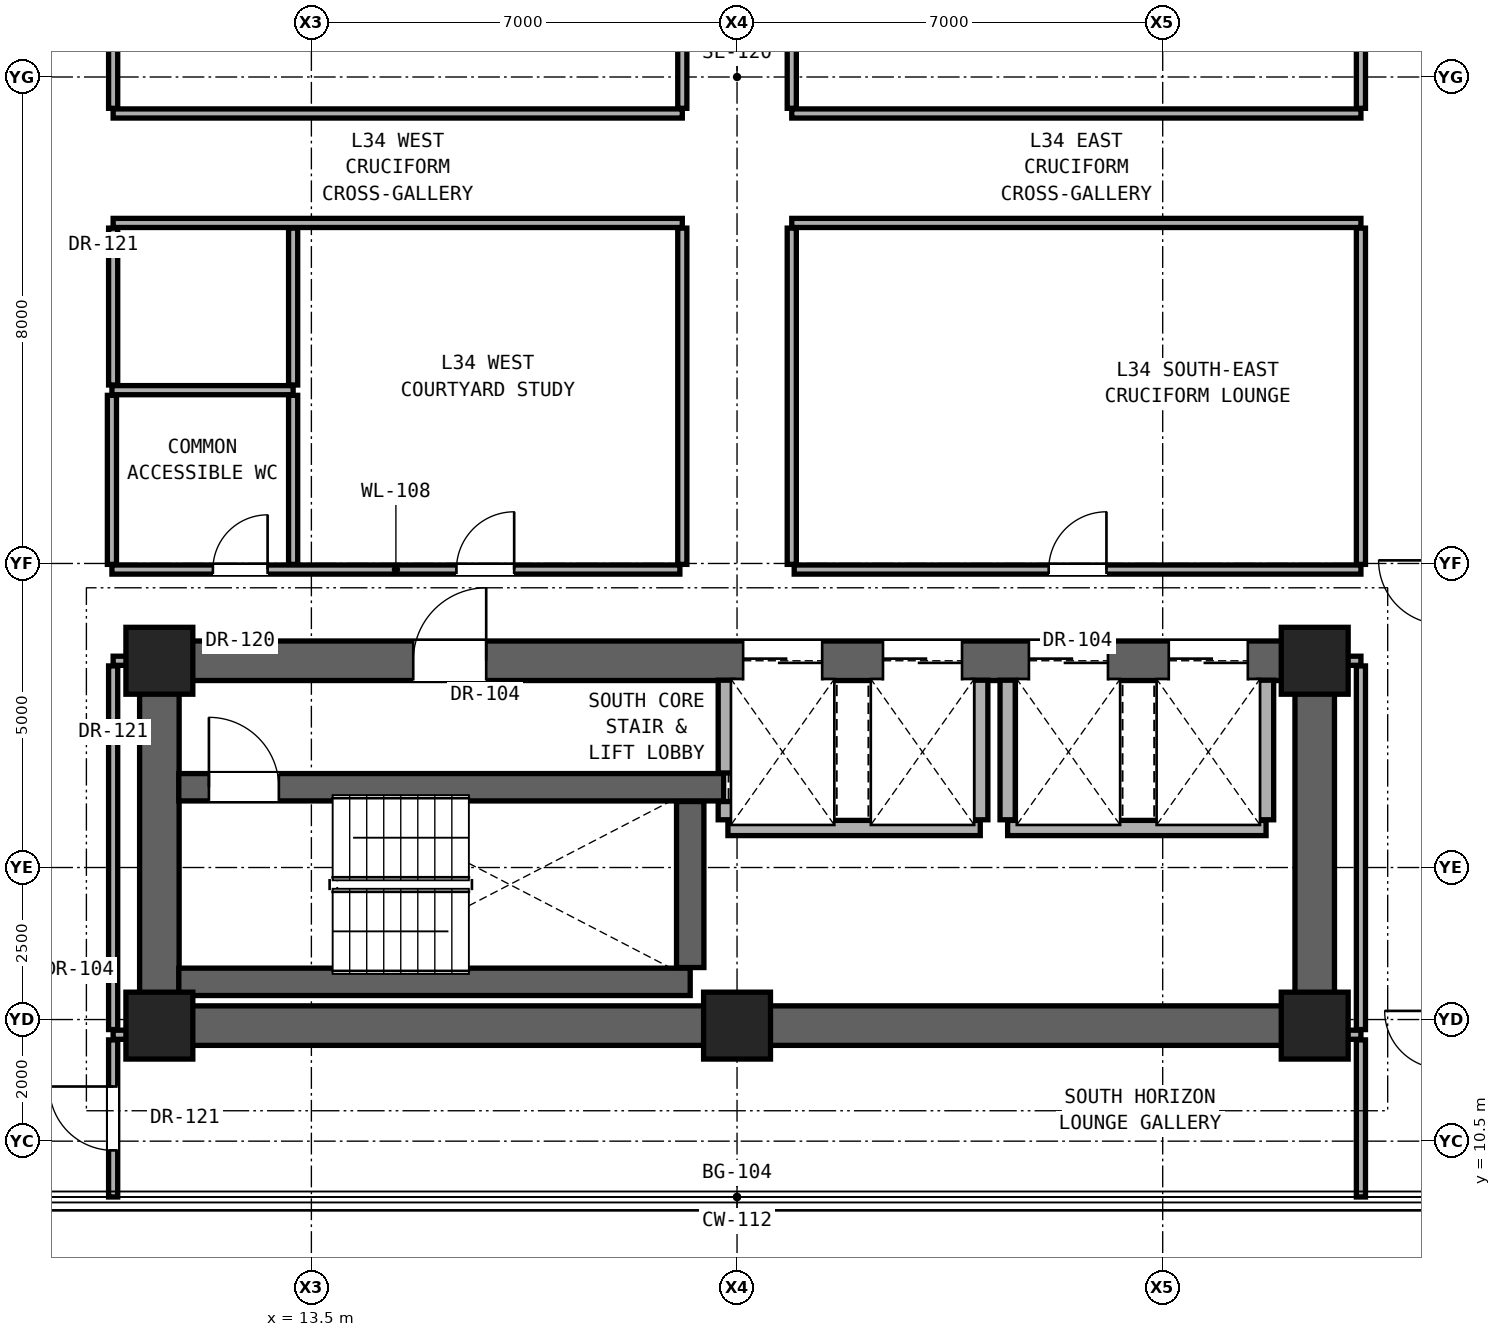
"""IFC4 building model, lengths in metres.
Left out: names, types, materials, properties, quantities, classifications, styles, units other than length and angle.
Written with IfcOpenShell. Run it as: python <this file> out.ifc"""

import sys

from ifc_helpers import new_model, si_unit, direction, frame, frame_2d, origin, origin_2d, place, context, subcontext, project, spatial, rectangle, extrude, element, fill, save


model = new_model("IFC4")
c1 = context("Model", 3, precision=1e-05, world=origin(), true_north=direction((0.0, 1.0)))
c2 = subcontext(c1, "Body", "Model", "MODEL_VIEW")
j1 = project(units=[si_unit("LENGTHUNIT", "METRE"), si_unit("PLANEANGLEUNIT", "RADIAN")], contexts=[c1])
p1 = place(None, origin())
s1 = spatial("IfcSite", under=j1, at=p1, CompositionType="ELEMENT")
p2 = place(p1, origin())
s2 = spatial("IfcBuilding", under=s1, at=p2, CompositionType="ELEMENT")
p3 = place(p2, frame((0.0, 0.0, 121.4)))
s3 = spatial("IfcBuildingStorey", under=s2, at=p3, CompositionType="ELEMENT", Elevation=121.4)
for number, where, z_axis, x_axis in (
    (1, (11.0, 12.4, 0.0), (0.0, 0.0, 1.0), (1.0, 0.0, 0.0)),
    (2, (20.5, 12.4, 0.0), (0.0, 0.0, 1.0), (1.0, 0.0, 0.0)),
    (3, (30.0, 12.4, 0.0), (0.0, 0.0, 1.0), (1.0, 0.0, 0.0)),
    (4, (11.0, 18.4, 0.0), (0.0, 0.0, 1.0), (1.0, 0.0, 0.0)),
    (5, (30.0, 18.4, 0.0), (0.0, 0.0, 1.0), (1.0, 0.0, 0.0)),
):
    element("IfcColumn", number, at=place(p3, frame(where, z_axis=z_axis, x_axis=x_axis)), inside=s3, PredefinedType="COLUMN", context=c2, shape_type="SweptSolid", body=[
        extrude(rectangle(XDim=1.1, YDim=1.1, at=origin_2d()), origin(), (0.0, 0.0, 1.0), 3.3),
    ])
p4 = place(p3, frame((11.0, 12.4, 0.0), z_axis=(0.0, 0.0, 1.0), x_axis=(1.0, 0.0, 0.0)))
e6 = element("IfcWall", 6, at=p4, inside=s3, PredefinedType="SHEAR", context=c2, shape_type="SweptSolid", body=[
    extrude(rectangle(XDim=19.0, YDim=0.65, at=frame_2d((9.5, 0.0))), origin(), (0.0, 0.0, 1.0), 3.08),
])
for number, where, z_axis, x_axis in (
    (7, (11.0, 12.4, 0.0), (0.0, 0.0, 1.0), (0.0, 1.0, 0.0)),
    (8, (30.0, 12.4, 0.0), (0.0, 0.0, 1.0), (0.0, 1.0, 0.0)),
):
    element("IfcWall", number, at=place(p3, frame(where, z_axis=z_axis, x_axis=x_axis)), inside=s3, PredefinedType="SHEAR", context=c2, shape_type="SweptSolid", body=[
        extrude(rectangle(XDim=6.0, YDim=0.65, at=frame_2d((3.0, 0.0))), origin(), (0.0, 0.0, 1.0), 3.08),
    ])
p5 = place(p3, frame((11.0, 18.4, 0.0), z_axis=(0.0, 0.0, 1.0), x_axis=(1.0, 0.0, 0.0)))
e9 = element("IfcWall", 9, at=p5, inside=s3, PredefinedType="SHEAR", context=c2, shape_type="SweptSolid", body=[
    extrude(rectangle(XDim=19.0, YDim=0.65, at=frame_2d((9.5, 0.0))), origin(), (0.0, 0.0, 1.0), 3.08),
])
p6 = place(p5, frame((4.175, 0.0, 0.0)))
e10 = element("IfcOpeningElement", 10, at=p6, cuts=e9, PredefinedType="OPENING", context=c2, shape_type="SweptSolid", body=[
    extrude(rectangle(XDim=1.2, YDim=2.25, at=frame_2d((0.6, 1.125))), frame((0.0, 0.335, 0.0), z_axis=(0.0, -1.0, 0.0), x_axis=(1.0, 0.0, 0.0)), (0.0, 0.0, 1.0), 0.67),
])
p7 = place(p5, frame((9.6, 0.0, 0.0)))
e11 = element("IfcOpeningElement", 11, at=p7, cuts=e9, PredefinedType="OPENING", context=c2, shape_type="SweptSolid", body=[
    extrude(rectangle(XDim=1.3, YDim=2.3, at=frame_2d((0.65, 1.15))), frame((0.0, 0.335, 0.0), z_axis=(0.0, -1.0, 0.0), x_axis=(1.0, 0.0, 0.0)), (0.0, 0.0, 1.0), 0.67),
])
p8 = place(p5, frame((11.9, 0.0, 0.0)))
e12 = element("IfcOpeningElement", 12, at=p8, cuts=e9, PredefinedType="OPENING", context=c2, shape_type="SweptSolid", body=[
    extrude(rectangle(XDim=1.3, YDim=2.3, at=frame_2d((0.65, 1.15))), frame((0.0, 0.335, 0.0), z_axis=(0.0, -1.0, 0.0), x_axis=(1.0, 0.0, 0.0)), (0.0, 0.0, 1.0), 0.67),
])
p9 = place(p5, frame((14.3, 0.0, 0.0)))
e13 = element("IfcOpeningElement", 13, at=p9, cuts=e9, PredefinedType="OPENING", context=c2, shape_type="SweptSolid", body=[
    extrude(rectangle(XDim=1.3, YDim=2.3, at=frame_2d((0.65, 1.15))), frame((0.0, 0.335, 0.0), z_axis=(0.0, -1.0, 0.0), x_axis=(1.0, 0.0, 0.0)), (0.0, 0.0, 1.0), 0.67),
])
p10 = place(p5, frame((16.6, 0.0, 0.0)))
e14 = element("IfcOpeningElement", 14, at=p10, cuts=e9, PredefinedType="OPENING", context=c2, shape_type="SweptSolid", body=[
    extrude(rectangle(XDim=1.3, YDim=2.3, at=frame_2d((0.65, 1.15))), frame((0.0, 0.335, 0.0), z_axis=(0.0, -1.0, 0.0), x_axis=(1.0, 0.0, 0.0)), (0.0, 0.0, 1.0), 0.67),
])
for number, where, z_axis, x_axis in (
    (15, (10.24, 12.25, 0.0), (0.0, 0.0, 1.0), (1.0, 0.0, 0.0)),
    (16, (30.32, 12.25, 0.0), (0.0, 0.0, 1.0), (1.0, 0.0, 0.0)),
):
    element("IfcWall", number, at=place(p3, frame(where, z_axis=z_axis, x_axis=x_axis)), inside=s3, PredefinedType="PARTITIONING", context=c2, shape_type="SweptSolid", body=[
        extrude(rectangle(XDim=0.44, YDim=0.15, at=frame_2d((0.22, 0.0))), origin(), (0.0, 0.0, 1.0), 3.08),
    ])
p11 = place(p3, frame((11.32, 13.12, 0.0), z_axis=(0.0, 0.0, 1.0), x_axis=(1.0, 0.0, 0.0)))
e17 = element("IfcWall", 17, at=p11, inside=s3, PredefinedType="SHEAR", context=c2, shape_type="SweptSolid", body=[
    extrude(rectangle(XDim=8.41, YDim=0.45, at=frame_2d((4.205, 0.0))), origin(), (0.0, 0.0, 1.0), 3.08),
])
p12 = place(p3, frame((20.35, 15.65, 0.0), z_axis=(0.0, 0.0, 1.0), x_axis=(1.0, 0.0, 0.0)))
e18 = element("IfcWall", 18, at=p12, inside=s3, PredefinedType="SOLIDWALL", context=c2, shape_type="SweptSolid", body=[
    extrude(rectangle(XDim=4.15, YDim=0.25, at=frame_2d((2.075, 0.0))), origin(), (0.0, 0.0, 1.0), 3.08),
])
p13 = place(p3, frame((24.95, 15.65, 0.0), z_axis=(0.0, 0.0, 1.0), x_axis=(1.0, 0.0, 0.0)))
e19 = element("IfcWall", 19, at=p13, inside=s3, PredefinedType="SOLIDWALL", context=c2, shape_type="SweptSolid", body=[
    extrude(rectangle(XDim=4.25, YDim=0.25, at=frame_2d((2.125, 0.0))), origin(), (0.0, 0.0, 1.0), 3.08),
])
p14 = place(p3, frame((11.32, 16.32, 0.0), z_axis=(0.0, 0.0, 1.0), x_axis=(1.0, 0.0, 0.0)))
e20 = element("IfcWall", 20, at=p14, inside=s3, PredefinedType="SHEAR", context=c2, shape_type="SweptSolid", body=[
    extrude(rectangle(XDim=8.96, YDim=0.45, at=frame_2d((4.48, 0.0))), origin(), (0.0, 0.0, 1.0), 3.08),
])
p15 = place(p14, frame((0.495, 0.0, 0.0)))
e21 = element("IfcOpeningElement", 21, at=p15, cuts=e20, PredefinedType="OPENING", context=c2, shape_type="SweptSolid", body=[
    extrude(rectangle(XDim=1.15, YDim=2.2, at=frame_2d((0.575, 1.1))), frame((0.0, 0.235, 0.0), z_axis=(0.0, -1.0, 0.0), x_axis=(1.0, 0.0, 0.0)), (0.0, 0.0, 1.0), 0.47),
])
for number, where, z_axis, x_axis in (
    (22, (10.24, 18.4, 0.0), (0.0, 0.0, 1.0), (1.0, 0.0, 0.0)),
    (23, (30.32, 18.4, 0.0), (0.0, 0.0, 1.0), (1.0, 0.0, 0.0)),
):
    element("IfcWall", number, at=place(p3, frame(where, z_axis=z_axis, x_axis=x_axis)), inside=s3, PredefinedType="PARTITIONING", context=c2, shape_type="SweptSolid", body=[
        extrude(rectangle(XDim=0.44, YDim=0.15, at=frame_2d((0.22, 0.0))), origin(), (0.0, 0.0, 1.0), 2.456),
    ])
p16 = place(p3, frame((10.22, 19.9, 0.0), z_axis=(0.0, 0.0, 1.0), x_axis=(1.0, 0.0, 0.0)))
e24 = element("IfcWall", 24, at=p16, inside=s3, PredefinedType="PARTITIONING", context=c2, shape_type="SweptSolid", body=[
    extrude(rectangle(XDim=9.34, YDim=0.15, at=frame_2d((4.67, 0.0))), origin(), (0.0, 0.0, 1.0), 2.216),
])
p17 = place(p16, frame((1.66, 0.0, 0.0)))
e25 = element("IfcOpeningElement", 25, at=p17, cuts=e24, PredefinedType="OPENING", context=c2, shape_type="SweptSolid", body=[
    extrude(rectangle(XDim=0.9, YDim=2.1, at=frame_2d((0.45, 1.05))), frame((0.0, 0.085, 0.0), z_axis=(0.0, -1.0, 0.0), x_axis=(1.0, 0.0, 0.0)), (0.0, 0.0, 1.0), 0.17),
])
p18 = place(p16, frame((5.665, 0.0, 0.0)))
e26 = element("IfcOpeningElement", 26, at=p18, cuts=e24, PredefinedType="OPENING", context=c2, shape_type="SweptSolid", body=[
    extrude(rectangle(XDim=0.95, YDim=2.15, at=frame_2d((0.475, 1.075))), frame((0.0, 0.085, 0.0), z_axis=(0.0, -1.0, 0.0), x_axis=(1.0, 0.0, 0.0)), (0.0, 0.0, 1.0), 0.17),
])
p19 = place(p3, frame((21.44, 19.9, 0.0), z_axis=(0.0, 0.0, 1.0), x_axis=(1.0, 0.0, 0.0)))
e27 = element("IfcWall", 27, at=p19, inside=s3, PredefinedType="PARTITIONING", context=c2, shape_type="SweptSolid", body=[
    extrude(rectangle(XDim=9.32, YDim=0.15, at=frame_2d((4.66, 0.0))), origin(), (0.0, 0.0, 1.0), 2.216),
])
p20 = place(p19, frame((4.185, 0.0, 0.0)))
e28 = element("IfcOpeningElement", 28, at=p20, cuts=e27, PredefinedType="OPENING", context=c2, shape_type="SweptSolid", body=[
    extrude(rectangle(XDim=0.95, YDim=2.15, at=frame_2d((0.475, 1.075))), frame((0.0, 0.085, 0.0), z_axis=(0.0, -1.0, 0.0), x_axis=(1.0, 0.0, 0.0)), (0.0, 0.0, 1.0), 0.17),
])
p21 = place(p3, frame((10.22, 22.85, 0.0), z_axis=(0.0, 0.0, 1.0), x_axis=(1.0, 0.0, 0.0)))
e29 = element("IfcWall", 29, at=p21, inside=s3, PredefinedType="PARTITIONING", context=c2, shape_type="SweptSolid", body=[
    extrude(rectangle(XDim=2.98, YDim=0.15, at=frame_2d((1.49, 0.0))), origin(), (0.0, 0.0, 1.0), 2.216),
])
for number, where, z_axis, x_axis in (
    (30, (10.24, 25.6, 0.0), (0.0, 0.0, 1.0), (1.0, 0.0, 0.0)),
    (31, (21.4, 25.6, 0.0), (0.0, 0.0, 1.0), (1.0, 0.0, 0.0)),
    (32, (10.24, 27.4, 0.0), (0.0, 0.0, 1.0), (1.0, 0.0, 0.0)),
    (33, (21.4, 27.4, 0.0), (0.0, 0.0, 1.0), (1.0, 0.0, 0.0)),
):
    element("IfcWall", number, at=place(p3, frame(where, z_axis=z_axis, x_axis=x_axis)), inside=s3, PredefinedType="PARTITIONING", context=c2, shape_type="SweptSolid", body=[
        extrude(rectangle(XDim=9.36, YDim=0.15, at=frame_2d((4.68, 0.0))), origin(), (0.0, 0.0, 1.0), 2.216),
    ])
p22 = place(p3, frame((10.22, 19.985, 0.0), z_axis=(0.0, 0.0, 1.0), x_axis=(0.0, 1.0, 0.0)))
e34 = element("IfcWall", 34, at=p22, inside=s3, PredefinedType="PARTITIONING", context=c2, shape_type="SweptSolid", body=[
    extrude(rectangle(XDim=2.78, YDim=0.15, at=frame_2d((1.39, 0.0))), origin(), (0.0, 0.0, 1.0), 3.08),
])
p23 = place(p3, frame((10.24, 9.582, 0.0), z_axis=(0.0, 0.0, 1.0), x_axis=(0.0, 1.0, 0.0)))
e35 = element("IfcWall", 35, at=p23, inside=s3, PredefinedType="PARTITIONING", context=c2, shape_type="SweptSolid", body=[
    extrude(rectangle(XDim=2.583, YDim=0.15, at=frame_2d((1.292, 0.0))), origin(), (0.0, 0.0, 1.0), 3.08),
])
p24 = place(p23, frame((0.767, 0.0, 0.0)))
e36 = element("IfcOpeningElement", 36, at=p24, cuts=e35, PredefinedType="OPENING", context=c2, shape_type="SweptSolid", body=[
    extrude(rectangle(XDim=1.05, YDim=2.2, at=frame_2d((0.525, 1.1))), frame((0.0, 0.085, 0.0), z_axis=(0.0, -1.0, 0.0), x_axis=(1.0, 0.0, 0.0)), (0.0, 0.0, 1.0), 0.17),
])
p25 = place(p3, frame((10.24, 12.335, 0.0), z_axis=(0.0, 0.0, 1.0), x_axis=(0.0, 1.0, 0.0)))
e37 = element("IfcWall", 37, at=p25, inside=s3, PredefinedType="PARTITIONING", context=c2, shape_type="SweptSolid", body=[
    extrude(rectangle(XDim=5.98, YDim=0.15, at=frame_2d((2.99, 0.0))), origin(), (0.0, 0.0, 1.0), 2.456),
])
p26 = place(p3, frame((10.24, 22.935, 0.0), z_axis=(0.0, 0.0, 1.0), x_axis=(0.0, 1.0, 0.0)))
e38 = element("IfcWall", 38, at=p26, inside=s3, PredefinedType="PARTITIONING", context=c2, shape_type="SweptSolid", body=[
    extrude(rectangle(XDim=2.58, YDim=0.15, at=frame_2d((1.29, 0.0))), origin(), (0.0, 0.0, 1.0), 2.299),
])
p27 = place(p3, frame((10.24, 27.485, 0.0), z_axis=(0.0, 0.0, 1.0), x_axis=(0.0, 1.0, 0.0)))
e39 = element("IfcWall", 39, at=p27, inside=s3, PredefinedType="PARTITIONING", context=c2, shape_type="SweptSolid", body=[
    extrude(rectangle(XDim=5.53, YDim=0.15, at=frame_2d((2.765, 0.0))), origin(), (0.0, 0.0, 1.0), 2.299),
])
p28 = place(p27, frame((2.29, 0.0, 0.0)))
e40 = element("IfcOpeningElement", 40, at=p28, cuts=e39, PredefinedType="OPENING", context=c2, shape_type="SweptSolid", body=[
    extrude(rectangle(XDim=0.95, YDim=2.15, at=frame_2d((0.475, 1.075))), frame((0.0, 0.085, 0.0), z_axis=(0.0, -1.0, 0.0), x_axis=(1.0, 0.0, 0.0)), (0.0, 0.0, 1.0), 0.17),
])
p29 = place(p3, frame((13.2, 19.985, 0.0), z_axis=(0.0, 0.0, 1.0), x_axis=(0.0, 1.0, 0.0)))
e41 = element("IfcWall", 41, at=p29, inside=s3, PredefinedType="PARTITIONING", context=c2, shape_type="SweptSolid", body=[
    extrude(rectangle(XDim=2.78, YDim=0.15, at=frame_2d((1.39, 0.0))), origin(), (0.0, 0.0, 1.0), 3.08),
])
p30 = place(p3, frame((13.2, 22.935, 0.0), z_axis=(0.0, 0.0, 1.0), x_axis=(0.0, 1.0, 0.0)))
e42 = element("IfcWall", 42, at=p30, inside=s3, PredefinedType="PARTITIONING", context=c2, shape_type="SweptSolid", body=[
    extrude(rectangle(XDim=2.58, YDim=0.15, at=frame_2d((1.29, 0.0))), origin(), (0.0, 0.0, 1.0), 2.216),
])
for number, where, z_axis, x_axis in (
    (43, (19.6, 19.985, 0.0), (0.0, 0.0, 1.0), (0.0, 1.0, 0.0)),
    (44, (19.6, 27.485, 0.0), (0.0, 0.0, 1.0), (0.0, 1.0, 0.0)),
):
    element("IfcWall", number, at=place(p3, frame(where, z_axis=z_axis, x_axis=x_axis)), inside=s3, PredefinedType="PARTITIONING", context=c2, shape_type="SweptSolid", body=[
        extrude(rectangle(XDim=5.53, YDim=0.15, at=frame_2d((2.765, 0.0))), origin(), (0.0, 0.0, 1.0), 2.216),
    ])
p31 = place(p3, frame((19.73, 13.355, 0.0), z_axis=(0.0, 0.0, 1.0), x_axis=(0.0, 1.0, 0.0)))
e45 = element("IfcWall", 45, at=p31, inside=s3, PredefinedType="SHEAR", context=c2, shape_type="SweptSolid", body=[
    extrude(rectangle(XDim=2.73, YDim=0.45, at=frame_2d((1.365, 0.0))), origin(), (0.0, 0.0, 1.0), 3.08),
])
p32 = place(p3, frame((20.315, 15.785, 0.0), z_axis=(0.0, 0.0, 1.0), x_axis=(0.0, 1.0, 0.0)))
e46 = element("IfcWall", 46, at=p32, inside=s3, PredefinedType="SOLIDWALL", context=c2, shape_type="SweptSolid", body=[
    extrude(rectangle(XDim=0.3, YDim=0.25, at=frame_2d((0.15, 0.0))), origin(), (0.0, 0.0, 1.0), 3.08),
])
p33 = place(p3, frame((20.315, 16.555, 0.0), z_axis=(0.0, 0.0, 1.0), x_axis=(0.0, 1.0, 0.0)))
e47 = element("IfcWall", 47, at=p33, inside=s3, PredefinedType="SOLIDWALL", context=c2, shape_type="SweptSolid", body=[
    extrude(rectangle(XDim=1.525, YDim=0.25, at=frame_2d((0.763, 0.0))), origin(), (0.0, 0.0, 1.0), 3.08),
])
for number, where, z_axis, x_axis in (
    (48, (21.4, 19.985, 0.0), (0.0, 0.0, 1.0), (0.0, 1.0, 0.0)),
    (49, (21.4, 27.485, 0.0), (0.0, 0.0, 1.0), (0.0, 1.0, 0.0)),
):
    element("IfcWall", number, at=place(p3, frame(where, z_axis=z_axis, x_axis=x_axis)), inside=s3, PredefinedType="PARTITIONING", context=c2, shape_type="SweptSolid", body=[
        extrude(rectangle(XDim=5.53, YDim=0.15, at=frame_2d((2.765, 0.0))), origin(), (0.0, 0.0, 1.0), 2.216),
    ])
for number, where, z_axis, x_axis in (
    (50, (24.5, 15.785, 0.0), (0.0, 0.0, 1.0), (0.0, 1.0, 0.0)),
    (51, (24.95, 15.785, 0.0), (0.0, 0.0, 1.0), (0.0, 1.0, 0.0)),
    (52, (29.2, 15.785, 0.0), (0.0, 0.0, 1.0), (0.0, 1.0, 0.0)),
):
    element("IfcWall", number, at=place(p3, frame(where, z_axis=z_axis, x_axis=x_axis)), inside=s3, PredefinedType="SOLIDWALL", context=c2, shape_type="SweptSolid", body=[
        extrude(rectangle(XDim=2.295, YDim=0.25, at=frame_2d((1.147, 0.0))), origin(), (0.0, 0.0, 1.0), 3.08),
    ])
p34 = place(p3, frame((30.76, 9.582, 0.0), z_axis=(0.0, 0.0, 1.0), x_axis=(0.0, 1.0, 0.0)))
e53 = element("IfcWall", 53, at=p34, inside=s3, PredefinedType="PARTITIONING", context=c2, shape_type="SweptSolid", body=[
    extrude(rectangle(XDim=2.583, YDim=0.15, at=frame_2d((1.292, 0.0))), origin(), (0.0, 0.0, 1.0), 3.08),
])
p35 = place(p3, frame((30.76, 12.335, 0.0), z_axis=(0.0, 0.0, 1.0), x_axis=(0.0, 1.0, 0.0)))
e54 = element("IfcWall", 54, at=p35, inside=s3, PredefinedType="PARTITIONING", context=c2, shape_type="SweptSolid", body=[
    extrude(rectangle(XDim=5.98, YDim=0.15, at=frame_2d((2.99, 0.0))), origin(), (0.0, 0.0, 1.0), 2.456),
])
for number, where, z_axis, x_axis in (
    (55, (30.76, 19.985, 0.0), (0.0, 0.0, 1.0), (0.0, 1.0, 0.0)),
    (56, (30.76, 27.485, 0.0), (0.0, 0.0, 1.0), (0.0, 1.0, 0.0)),
):
    element("IfcWall", number, at=place(p3, frame(where, z_axis=z_axis, x_axis=x_axis)), inside=s3, PredefinedType="PARTITIONING", context=c2, shape_type="SweptSolid", body=[
        extrude(rectangle(XDim=5.53, YDim=0.15, at=frame_2d((2.765, 0.0))), origin(), (0.0, 0.0, 1.0), 2.299),
    ])
p36 = place(p6, origin())
e57 = element("IfcDoor", 57, at=p36, inside=s3, OperationType="SINGLE_SWING_RIGHT", PredefinedType="DOOR", context=c2, shape_type="SweptSolid", body=[
    extrude(rectangle(XDim=1.2, YDim=2.25, at=frame_2d((0.6, 1.125))), frame((0.0, 0.025, 0.0), z_axis=(0.0, -1.0, 0.0), x_axis=(1.0, 0.0, 0.0)), (0.0, 0.0, 1.0), 0.05),
])
fill(e10, e57)
p37 = place(p15, origin())
e58 = element("IfcDoor", 58, at=p37, inside=s3, OperationType="SINGLE_SWING_LEFT", PredefinedType="DOOR", context=c2, shape_type="SweptSolid", body=[
    extrude(rectangle(XDim=1.15, YDim=2.2, at=frame_2d((0.575, 1.1))), frame((0.0, 0.025, 0.0), z_axis=(0.0, -1.0, 0.0), x_axis=(1.0, 0.0, 0.0)), (0.0, 0.0, 1.0), 0.05),
])
fill(e21, e58)
p38 = place(p17, origin())
e59 = element("IfcDoor", 59, at=p38, inside=s3, OperationType="SINGLE_SWING_RIGHT", PredefinedType="DOOR", context=c2, shape_type="SweptSolid", body=[
    extrude(rectangle(XDim=0.9, YDim=2.1, at=frame_2d((0.45, 1.05))), frame((0.0, 0.025, 0.0), z_axis=(0.0, -1.0, 0.0), x_axis=(1.0, 0.0, 0.0)), (0.0, 0.0, 1.0), 0.05),
])
fill(e25, e59)
p39 = place(p18, origin())
e60 = element("IfcDoor", 60, at=p39, inside=s3, OperationType="SINGLE_SWING_RIGHT", PredefinedType="DOOR", context=c2, shape_type="SweptSolid", body=[
    extrude(rectangle(XDim=0.95, YDim=2.15, at=frame_2d((0.475, 1.075))), frame((0.0, 0.025, 0.0), z_axis=(0.0, -1.0, 0.0), x_axis=(1.0, 0.0, 0.0)), (0.0, 0.0, 1.0), 0.05),
])
fill(e26, e60)
p40 = place(p20, origin())
e61 = element("IfcDoor", 61, at=p40, inside=s3, OperationType="SINGLE_SWING_RIGHT", PredefinedType="DOOR", context=c2, shape_type="SweptSolid", body=[
    extrude(rectangle(XDim=0.95, YDim=2.15, at=frame_2d((0.475, 1.075))), frame((0.0, 0.025, 0.0), z_axis=(0.0, -1.0, 0.0), x_axis=(1.0, 0.0, 0.0)), (0.0, 0.0, 1.0), 0.05),
])
fill(e28, e61)
p41 = place(p24, origin())
e62 = element("IfcDoor", 62, at=p41, inside=s3, OperationType="SINGLE_SWING_RIGHT", PredefinedType="DOOR", context=c2, shape_type="SweptSolid", body=[
    extrude(rectangle(XDim=1.05, YDim=2.2, at=frame_2d((0.525, 1.1))), frame((0.0, 0.025, 0.0), z_axis=(0.0, -1.0, 0.0), x_axis=(1.0, 0.0, 0.0)), (0.0, 0.0, 1.0), 0.05),
])
fill(e36, e62)
p42 = place(p7, origin())
e63 = element("IfcDoor", 63, at=p42, inside=s3, OperationType="DOUBLE_DOOR_SLIDING", PredefinedType="DOOR", context=c2, shape_type="SweptSolid", body=[
    extrude(rectangle(XDim=1.3, YDim=2.3, at=frame_2d((0.65, 1.15))), frame((0.0, 0.025, 0.0), z_axis=(0.0, -1.0, 0.0), x_axis=(1.0, 0.0, 0.0)), (0.0, 0.0, 1.0), 0.05),
])
fill(e11, e63)
p43 = place(p8, origin())
e64 = element("IfcDoor", 64, at=p43, inside=s3, OperationType="DOUBLE_DOOR_SLIDING", PredefinedType="DOOR", context=c2, shape_type="SweptSolid", body=[
    extrude(rectangle(XDim=1.3, YDim=2.3, at=frame_2d((0.65, 1.15))), frame((0.0, 0.025, 0.0), z_axis=(0.0, -1.0, 0.0), x_axis=(1.0, 0.0, 0.0)), (0.0, 0.0, 1.0), 0.05),
])
fill(e12, e64)
p44 = place(p9, origin())
e65 = element("IfcDoor", 65, at=p44, inside=s3, OperationType="DOUBLE_DOOR_SLIDING", PredefinedType="DOOR", context=c2, shape_type="SweptSolid", body=[
    extrude(rectangle(XDim=1.3, YDim=2.3, at=frame_2d((0.65, 1.15))), frame((0.0, 0.025, 0.0), z_axis=(0.0, -1.0, 0.0), x_axis=(1.0, 0.0, 0.0)), (0.0, 0.0, 1.0), 0.05),
])
fill(e13, e65)
p45 = place(p10, origin())
e66 = element("IfcDoor", 66, at=p45, inside=s3, OperationType="DOUBLE_DOOR_SLIDING", PredefinedType="DOOR", context=c2, shape_type="SweptSolid", body=[
    extrude(rectangle(XDim=1.3, YDim=2.3, at=frame_2d((0.65, 1.15))), frame((0.0, 0.025, 0.0), z_axis=(0.0, -1.0, 0.0), x_axis=(1.0, 0.0, 0.0)), (0.0, 0.0, 1.0), 0.05),
])
fill(e14, e66)
save(model, sys.argv[1])
